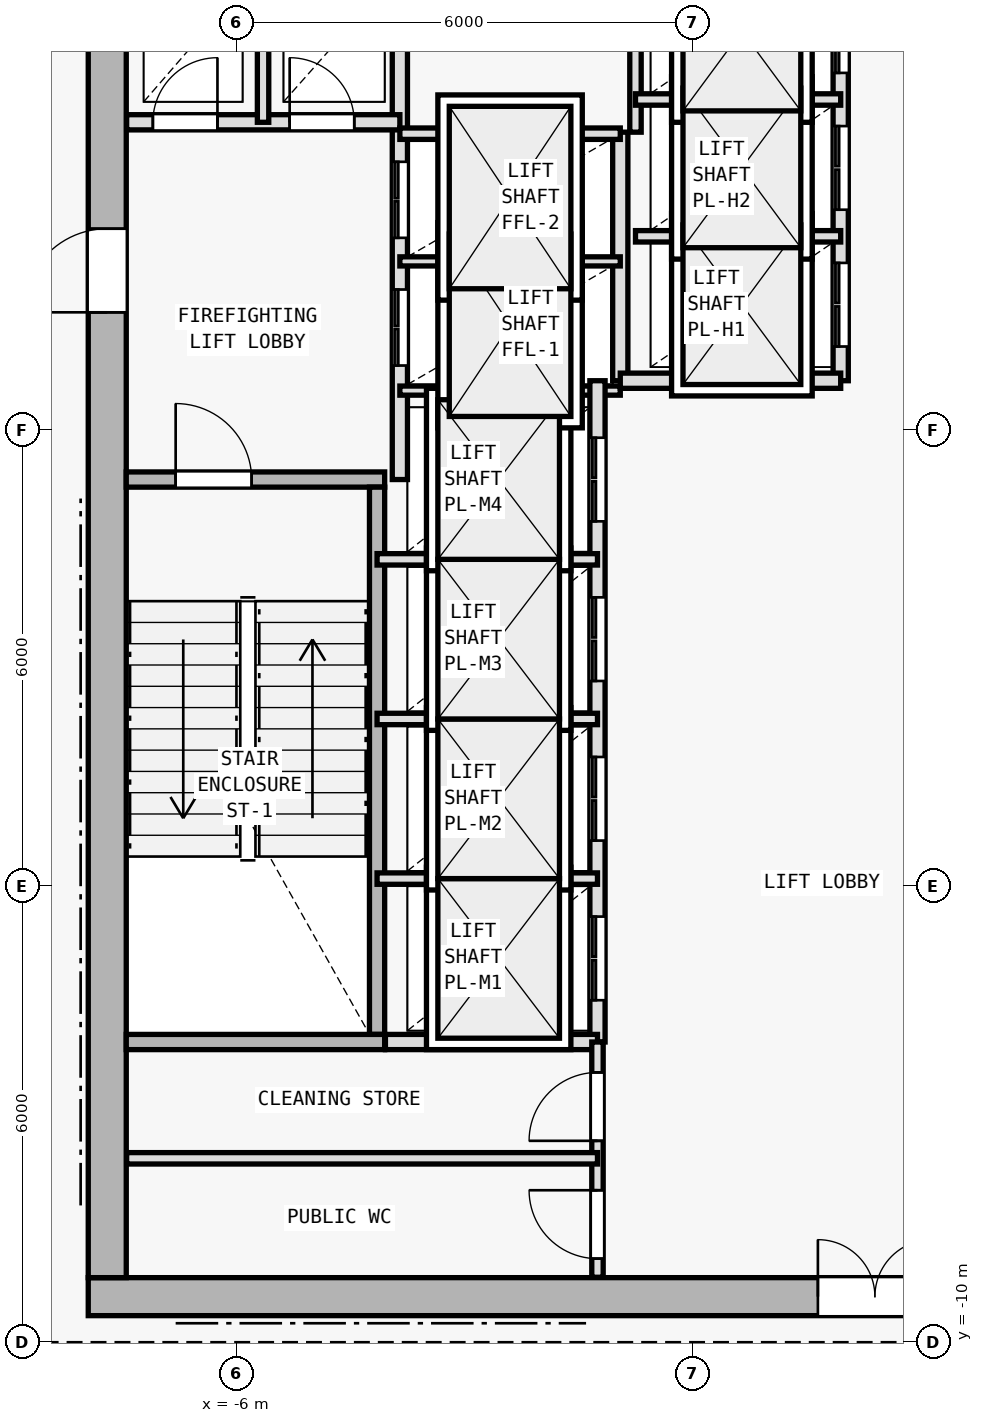
"""IFC4 building model, lengths in metres.
Left out: names, types, materials, properties, quantities, classifications, styles, units other than length and angle.
Written with IfcOpenShell. Run it as: python <this file> out.ifc"""

import sys

from ifc_helpers import new_model, si_unit, direction, frame, frame_2d, origin, origin_2d, place, context, subcontext, project, spatial, rectangle, i_section, extrude, element, fill, save


model = new_model("IFC4")
c1 = context("Model", 3, precision=1e-05, world=origin(), true_north=direction((0.0, 1.0)))
c2 = subcontext(c1, "Body", "Model", "MODEL_VIEW")
j1 = project(units=[si_unit("LENGTHUNIT", "METRE"), si_unit("PLANEANGLEUNIT", "RADIAN")], contexts=[c1])
p1 = place(None, origin())
s1 = spatial("IfcSite", under=j1, at=p1, CompositionType="ELEMENT")
p2 = place(p1, origin())
s2 = spatial("IfcBuilding", under=s1, at=p2, CompositionType="ELEMENT")
p3 = place(p2, frame((0.0, 0.0, 134.1)))
s3 = spatial("IfcBuildingStorey", under=s2, at=p3, CompositionType="ELEMENT", Elevation=134.1)
for number, where, z_axis, x_axis in (
    (1, (-7.7, -9.4, 0.0), (0.0, 0.0, 1.0), (1.0, 0.0, 0.0)),
    (2, (0.0, -9.4, 0.0), (0.0, 0.0, 1.0), (1.0, 0.0, 0.0)),
    (3, (-7.7, 2.0, 0.0), (0.0, 0.0, 1.0), (1.0, 0.0, 0.0)),
):
    element("IfcColumn", number, at=place(p3, frame(where, z_axis=z_axis, x_axis=x_axis)), inside=s3, PredefinedType="COLUMN", context=c2, shape_type="SweptSolid", body=[
        extrude(i_section(OverallWidth=0.409, OverallDepth=0.425, WebThickness=0.021, FlangeThickness=0.034, FilletRadius=0.015, at=origin_2d()), origin(), (0.0, 0.0, 1.0), 4.5),
    ])
p4 = place(p3, frame((-7.95, -9.4, 0.0), z_axis=(0.0, 0.0, 1.0), x_axis=(1.0, 0.0, 0.0)))
e4 = element("IfcWall", 4, at=p4, inside=s3, PredefinedType="SHEAR", context=c2, shape_type="SweptSolid", body=[
    extrude(rectangle(XDim=15.9, YDim=0.5, at=frame_2d((7.95, 0.0))), origin(), (0.0, 0.0, 1.0), 4.25),
])
p5 = place(p4, frame((9.6, 0.0, 0.0)))
e5 = element("IfcOpeningElement", 5, at=p5, cuts=e4, PredefinedType="OPENING", context=c2, shape_type="SweptSolid", body=[
    extrude(rectangle(XDim=1.5, YDim=2.2, at=frame_2d((0.75, 1.1))), frame((0.0, 0.26, 0.0), z_axis=(0.0, -1.0, 0.0), x_axis=(1.0, 0.0, 0.0)), (0.0, 0.0, 1.0), 0.52),
])
p6 = place(p3, frame((-7.7, -9.15, 0.0), z_axis=(0.0, 0.0, 1.0), x_axis=(0.0, 1.0, 0.0)))
e6 = element("IfcWall", 6, at=p6, inside=s3, PredefinedType="SHEAR", context=c2, shape_type="SweptSolid", body=[
    extrude(rectangle(XDim=19.1, YDim=0.5, at=frame_2d((9.55, 0.0))), origin(), (0.0, 0.0, 1.0), 4.25),
])
p7 = place(p6, frame((12.7, 0.0, 0.0)))
e7 = element("IfcOpeningElement", 7, at=p7, cuts=e6, PredefinedType="OPENING", context=c2, shape_type="SweptSolid", body=[
    extrude(rectangle(XDim=1.1, YDim=2.15, at=frame_2d((0.55, 1.075))), frame((0.0, 0.26, 0.0), z_axis=(0.0, -1.0, 0.0), x_axis=(1.0, 0.0, 0.0)), (0.0, 0.0, 1.0), 0.52),
])
p8 = place(p3, frame((-7.45, 1.35, 0.0), z_axis=(0.0, 0.0, 1.0), x_axis=(1.0, 0.0, 0.0)))
e8 = element("IfcWall", 8, at=p8, inside=s3, PredefinedType="SOLIDWALL", context=c2, shape_type="SweptSolid", body=[
    extrude(rectangle(XDim=3.4, YDim=0.2, at=frame_2d((1.7, 0.0))), origin(), (0.0, 0.0, 1.0), 4.25),
])
p9 = place(p8, frame((0.65, 0.0, 0.0)))
e9 = element("IfcOpeningElement", 9, at=p9, cuts=e8, PredefinedType="OPENING", context=c2, shape_type="SweptSolid", body=[
    extrude(rectangle(XDim=1.0, YDim=2.15, at=frame_2d((0.5, 1.075))), frame((0.0, 0.11, 0.0), z_axis=(0.0, -1.0, 0.0), x_axis=(1.0, 0.0, 0.0)), (0.0, 0.0, 1.0), 0.22),
])
p10 = place(p3, frame((-4.15, -5.95, 0.0), z_axis=(0.0, 0.0, 1.0), x_axis=(0.0, 1.0, 0.0)))
e10 = element("IfcWall", 10, at=p10, inside=s3, PredefinedType="SOLIDWALL", context=c2, shape_type="SweptSolid", body=[
    extrude(rectangle(XDim=7.2, YDim=0.2, at=frame_2d((3.6, 0.0))), origin(), (0.0, 0.0, 1.0), 4.25),
])
p11 = place(p3, frame((-3.85, 1.35, 0.0), z_axis=(0.0, 0.0, 1.0), x_axis=(0.0, 1.0, 0.0)))
e11 = element("IfcWall", 11, at=p11, inside=s3, PredefinedType="SOLIDWALL", context=c2, shape_type="SweptSolid", body=[
    extrude(rectangle(XDim=8.595, YDim=0.2, at=frame_2d((4.297, 0.0))), origin(), (0.0, 0.0, 1.0), 4.25),
])
p12 = place(p11, frame((1.5, 0.0, 0.0)))
e12 = element("IfcOpeningElement", 12, at=p12, cuts=e11, PredefinedType="OPENING", context=c2, shape_type="SweptSolid", body=[
    extrude(rectangle(XDim=1.0, YDim=2.15, at=frame_2d((0.5, 1.075))), frame((0.0, 0.11, 0.0), z_axis=(0.0, -1.0, 0.0), x_axis=(1.0, 0.0, 0.0)), (0.0, 0.0, 1.0), 0.22),
])
p13 = place(p11, frame((3.18, 0.0, 0.0)))
e13 = element("IfcOpeningElement", 13, at=p13, cuts=e11, PredefinedType="OPENING", context=c2, shape_type="SweptSolid", body=[
    extrude(rectangle(XDim=1.0, YDim=2.15, at=frame_2d((0.5, 1.075))), frame((0.0, 0.11, 0.0), z_axis=(0.0, -1.0, 0.0), x_axis=(1.0, 0.0, 0.0)), (0.0, 0.0, 1.0), 0.22),
])
p14 = place(p3, frame((-7.445, 6.05, 0.0), z_axis=(0.0, 0.0, 1.0), x_axis=(1.0, 0.0, 0.0)))
e14 = element("IfcWall", 14, at=p14, inside=s3, PredefinedType="SOLIDWALL", context=c2, shape_type="SweptSolid", body=[
    extrude(rectangle(XDim=3.595, YDim=0.2, at=frame_2d((1.797, 0.0))), origin(), (0.0, 0.0, 1.0), 4.25),
])
p15 = place(p14, frame((0.345, 0.0, 0.0)))
e15 = element("IfcOpeningElement", 15, at=p15, cuts=e14, PredefinedType="OPENING", context=c2, shape_type="SweptSolid", body=[
    extrude(rectangle(XDim=0.85, YDim=2.1, at=frame_2d((0.425, 1.05))), frame((0.0, 0.11, 0.0), z_axis=(0.0, -1.0, 0.0), x_axis=(1.0, 0.0, 0.0)), (0.0, 0.0, 1.0), 0.22),
])
p16 = place(p14, frame((2.145, 0.0, 0.0)))
e16 = element("IfcOpeningElement", 16, at=p16, cuts=e14, PredefinedType="OPENING", context=c2, shape_type="SweptSolid", body=[
    extrude(rectangle(XDim=0.85, YDim=2.1, at=frame_2d((0.425, 1.05))), frame((0.0, 0.11, 0.0), z_axis=(0.0, -1.0, 0.0), x_axis=(1.0, 0.0, 0.0)), (0.0, 0.0, 1.0), 0.22),
])
p17 = place(p3, frame((-5.65, 6.05, 0.0), z_axis=(0.0, 0.0, 1.0), x_axis=(0.0, 1.0, 0.0)))
e17 = element("IfcWall", 17, at=p17, inside=s3, PredefinedType="PARTITIONING", context=c2, shape_type="SweptSolid", body=[
    extrude(rectangle(XDim=2.05, YDim=0.15, at=frame_2d((1.025, 0.0))), origin(), (0.0, 0.0, 1.0), 4.25),
])
p18 = place(p3, frame((-0.95, 2.65, 0.0), z_axis=(0.0, 0.0, 1.0), x_axis=(0.0, 1.0, 0.0)))
e18 = element("IfcWall", 18, at=p18, inside=s3, PredefinedType="SOLIDWALL", context=c2, shape_type="SweptSolid", body=[
    extrude(rectangle(XDim=3.27, YDim=0.2, at=frame_2d((1.635, 0.0))), origin(), (0.0, 0.0, 1.0), 4.25),
])
for number, where, z_axis, x_axis in (
    (19, (-3.85, 2.52, 0.0), (0.0, 0.0, 1.0), (1.0, 0.0, 0.0)),
    (20, (-3.85, 4.22, 0.0), (0.0, 0.0, 1.0), (1.0, 0.0, 0.0)),
):
    element("IfcWall", number, at=place(p3, frame(where, z_axis=z_axis, x_axis=x_axis)), inside=s3, PredefinedType="PARTITIONING", context=c2, shape_type="SweptSolid", body=[
        extrude(rectangle(XDim=2.9, YDim=0.12, at=frame_2d((1.45, 0.0))), origin(), (0.0, 0.0, 1.0), 4.25),
    ])
p19 = place(p3, frame((-3.85, 5.9, 0.0), z_axis=(0.0, 0.0, 1.0), x_axis=(1.0, 0.0, 0.0)))
e21 = element("IfcWall", 21, at=p19, inside=s3, PredefinedType="PARTITIONING", context=c2, shape_type="SweptSolid", body=[
    extrude(rectangle(XDim=2.9, YDim=0.15, at=frame_2d((1.45, 0.0))), origin(), (0.0, 0.0, 1.0), 4.25),
])
p20 = place(p3, frame((-1.25, -6.05, 0.0), z_axis=(0.0, 0.0, 1.0), x_axis=(0.0, 1.0, 0.0)))
e22 = element("IfcWall", 22, at=p20, inside=s3, PredefinedType="SOLIDWALL", context=c2, shape_type="SweptSolid", body=[
    extrude(rectangle(XDim=8.7, YDim=0.2, at=frame_2d((4.35, 0.0))), origin(), (0.0, 0.0, 1.0), 4.25),
])
p21 = place(p20, frame((0.55, 0.0, 0.0)))
e23 = element("IfcOpeningElement", 23, at=p21, cuts=e22, PredefinedType="OPENING", context=c2, shape_type="SweptSolid", body=[
    extrude(rectangle(XDim=1.1, YDim=2.15, at=frame_2d((0.55, 1.075))), frame((0.0, 0.11, 0.0), z_axis=(0.0, -1.0, 0.0), x_axis=(1.0, 0.0, 0.0)), (0.0, 0.0, 1.0), 0.22),
])
p22 = place(p20, frame((2.65, 0.0, 0.0)))
e24 = element("IfcOpeningElement", 24, at=p22, cuts=e22, PredefinedType="OPENING", context=c2, shape_type="SweptSolid", body=[
    extrude(rectangle(XDim=1.1, YDim=2.15, at=frame_2d((0.55, 1.075))), frame((0.0, 0.11, 0.0), z_axis=(0.0, -1.0, 0.0), x_axis=(1.0, 0.0, 0.0)), (0.0, 0.0, 1.0), 0.22),
])
p23 = place(p20, frame((4.75, 0.0, 0.0)))
e25 = element("IfcOpeningElement", 25, at=p23, cuts=e22, PredefinedType="OPENING", context=c2, shape_type="SweptSolid", body=[
    extrude(rectangle(XDim=1.1, YDim=2.15, at=frame_2d((0.55, 1.075))), frame((0.0, 0.11, 0.0), z_axis=(0.0, -1.0, 0.0), x_axis=(1.0, 0.0, 0.0)), (0.0, 0.0, 1.0), 0.22),
])
p24 = place(p20, frame((6.85, 0.0, 0.0)))
e26 = element("IfcOpeningElement", 26, at=p24, cuts=e22, PredefinedType="OPENING", context=c2, shape_type="SweptSolid", body=[
    extrude(rectangle(XDim=1.1, YDim=2.15, at=frame_2d((0.55, 1.075))), frame((0.0, 0.11, 0.0), z_axis=(0.0, -1.0, 0.0), x_axis=(1.0, 0.0, 0.0)), (0.0, 0.0, 1.0), 0.22),
])
for number, where, z_axis, x_axis in (
    (27, (-4.15, -3.9, 0.0), (0.0, 0.0, 1.0), (1.0, 0.0, 0.0)),
    (28, (-4.15, -1.8, 0.0), (0.0, 0.0, 1.0), (1.0, 0.0, 0.0)),
    (29, (-4.15, 0.3, 0.0), (0.0, 0.0, 1.0), (1.0, 0.0, 0.0)),
):
    element("IfcWall", number, at=place(p3, frame(where, z_axis=z_axis, x_axis=x_axis)), inside=s3, PredefinedType="PARTITIONING", context=c2, shape_type="SweptSolid", body=[
        extrude(rectangle(XDim=2.9, YDim=0.15, at=frame_2d((1.45, 0.0))), origin(), (0.0, 0.0, 1.0), 4.25),
    ])
p25 = place(p3, frame((1.95, 2.65, 0.0), z_axis=(0.0, 0.0, 1.0), x_axis=(0.0, 1.0, 0.0)))
e30 = element("IfcWall", 30, at=p25, inside=s3, PredefinedType="SOLIDWALL", context=c2, shape_type="SweptSolid", body=[
    extrude(rectangle(XDim=7.295, YDim=0.2, at=frame_2d((3.647, 0.0))), origin(), (0.0, 0.0, 1.0), 4.25),
])
p26 = place(p25, frame((0.45, 0.0, 0.0)))
e31 = element("IfcOpeningElement", 31, at=p26, cuts=e30, PredefinedType="OPENING", context=c2, shape_type="SweptSolid", body=[
    extrude(rectangle(XDim=1.1, YDim=2.15, at=frame_2d((0.55, 1.075))), frame((0.0, 0.11, 0.0), z_axis=(0.0, -1.0, 0.0), x_axis=(1.0, 0.0, 0.0)), (0.0, 0.0, 1.0), 0.22),
])
p27 = place(p25, frame((2.25, 0.0, 0.0)))
e32 = element("IfcOpeningElement", 32, at=p27, cuts=e30, PredefinedType="OPENING", context=c2, shape_type="SweptSolid", body=[
    extrude(rectangle(XDim=1.1, YDim=2.15, at=frame_2d((0.55, 1.075))), frame((0.0, 0.11, 0.0), z_axis=(0.0, -1.0, 0.0), x_axis=(1.0, 0.0, 0.0)), (0.0, 0.0, 1.0), 0.22),
])
p28 = place(p25, frame((4.05, 0.0, 0.0)))
e33 = element("IfcOpeningElement", 33, at=p28, cuts=e30, PredefinedType="OPENING", context=c2, shape_type="SweptSolid", body=[
    extrude(rectangle(XDim=1.1, YDim=2.15, at=frame_2d((0.55, 1.075))), frame((0.0, 0.11, 0.0), z_axis=(0.0, -1.0, 0.0), x_axis=(1.0, 0.0, 0.0)), (0.0, 0.0, 1.0), 0.22),
])
p29 = place(p25, frame((5.85, 0.0, 0.0)))
e34 = element("IfcOpeningElement", 34, at=p29, cuts=e30, PredefinedType="OPENING", context=c2, shape_type="SweptSolid", body=[
    extrude(rectangle(XDim=1.1, YDim=2.15, at=frame_2d((0.55, 1.075))), frame((0.0, 0.11, 0.0), z_axis=(0.0, -1.0, 0.0), x_axis=(1.0, 0.0, 0.0)), (0.0, 0.0, 1.0), 0.22),
])
p30 = place(p3, frame((-0.95, 2.65, 0.0), z_axis=(0.0, 0.0, 1.0), x_axis=(1.0, 0.0, 0.0)))
e35 = element("IfcWall", 35, at=p30, inside=s3, PredefinedType="SOLIDWALL", context=c2, shape_type="SweptSolid", body=[
    extrude(rectangle(XDim=2.9, YDim=0.2, at=frame_2d((1.45, 0.0))), origin(), (0.0, 0.0, 1.0), 4.25),
])
p31 = place(p3, frame((-0.75, 5.92, 0.0), z_axis=(0.0, 0.0, 1.0), x_axis=(0.0, 1.0, 0.0)))
e36 = element("IfcWall", 36, at=p31, inside=s3, PredefinedType="PARTITIONING", context=c2, shape_type="SweptSolid", body=[
    extrude(rectangle(XDim=4.025, YDim=0.15, at=frame_2d((2.013, 0.0))), origin(), (0.0, 0.0, 1.0), 4.25),
])
for number, where, z_axis, x_axis in (
    (37, (-0.75, 4.55, 0.0), (0.0, 0.0, 1.0), (1.0, 0.0, 0.0)),
    (38, (-0.75, 6.35, 0.0), (0.0, 0.0, 1.0), (1.0, 0.0, 0.0)),
):
    element("IfcWall", number, at=place(p3, frame(where, z_axis=z_axis, x_axis=x_axis)), inside=s3, PredefinedType="PARTITIONING", context=c2, shape_type="SweptSolid", body=[
        extrude(rectangle(XDim=2.7, YDim=0.15, at=frame_2d((1.35, 0.0))), origin(), (0.0, 0.0, 1.0), 4.25),
    ])
p32 = place(p3, frame((-7.45, -6.05, 0.0), z_axis=(0.0, 0.0, 1.0), x_axis=(1.0, 0.0, 0.0)))
e39 = element("IfcWall", 39, at=p32, inside=s3, PredefinedType="SOLIDWALL", context=c2, shape_type="SweptSolid", body=[
    extrude(rectangle(XDim=3.4, YDim=0.2, at=frame_2d((1.7, 0.0))), origin(), (0.0, 0.0, 1.0), 4.25),
])
p33 = place(p3, frame((-4.04, -6.05, 0.0), z_axis=(0.0, 0.0, 1.0), x_axis=(1.0, 0.0, 0.0)))
e40 = element("IfcWall", 40, at=p33, inside=s3, PredefinedType="SOLIDWALL", context=c2, shape_type="SweptSolid", body=[
    extrude(rectangle(XDim=2.79, YDim=0.2, at=frame_2d((1.395, 0.0))), origin(), (0.0, 0.0, 1.0), 4.25),
])
p34 = place(p3, frame((-1.25, -9.145, 0.0), z_axis=(0.0, 0.0, 1.0), x_axis=(0.0, 1.0, 0.0)))
e41 = element("IfcWall", 41, at=p34, inside=s3, PredefinedType="PARTITIONING", context=c2, shape_type="SweptSolid", body=[
    extrude(rectangle(XDim=3.095, YDim=0.15, at=frame_2d((1.547, 0.0))), origin(), (0.0, 0.0, 1.0), 4.25),
])
p35 = place(p34, frame((1.795, 0.0, 0.0)))
e42 = element("IfcOpeningElement", 42, at=p35, cuts=e41, PredefinedType="OPENING", context=c2, shape_type="SweptSolid", body=[
    extrude(rectangle(XDim=0.9, YDim=2.1, at=frame_2d((0.45, 1.05))), frame((0.0, 0.085, 0.0), z_axis=(0.0, -1.0, 0.0), x_axis=(1.0, 0.0, 0.0)), (0.0, 0.0, 1.0), 0.17),
])
p36 = place(p34, frame((0.245, 0.0, 0.0)))
e43 = element("IfcOpeningElement", 43, at=p36, cuts=e41, PredefinedType="OPENING", context=c2, shape_type="SweptSolid", body=[
    extrude(rectangle(XDim=0.9, YDim=2.1, at=frame_2d((0.45, 1.05))), frame((0.0, 0.085, 0.0), z_axis=(0.0, -1.0, 0.0), x_axis=(1.0, 0.0, 0.0)), (0.0, 0.0, 1.0), 0.17),
])
p37 = place(p3, frame((-7.445, -7.58, 0.0), z_axis=(0.0, 0.0, 1.0), x_axis=(1.0, 0.0, 0.0)))
e44 = element("IfcWall", 44, at=p37, inside=s3, PredefinedType="PARTITIONING", context=c2, shape_type="SweptSolid", body=[
    extrude(rectangle(XDim=6.195, YDim=0.15, at=frame_2d((3.098, 0.0))), origin(), (0.0, 0.0, 1.0), 4.25),
])
p38 = place(p5, origin())
e45 = element("IfcDoor", 45, at=p38, inside=s3, OperationType="DOUBLE_DOOR_SINGLE_SWING", PredefinedType="DOOR", context=c2, shape_type="SweptSolid", body=[
    extrude(rectangle(XDim=1.5, YDim=2.2, at=frame_2d((0.75, 1.1))), frame((0.0, 0.025, 0.0), z_axis=(0.0, -1.0, 0.0), x_axis=(1.0, 0.0, 0.0)), (0.0, 0.0, 1.0), 0.05),
])
fill(e5, e45)
p39 = place(p7, origin())
e46 = element("IfcDoor", 46, at=p39, inside=s3, OperationType="SINGLE_SWING_LEFT", PredefinedType="DOOR", context=c2, shape_type="SweptSolid", body=[
    extrude(rectangle(XDim=1.1, YDim=2.15, at=frame_2d((0.55, 1.075))), frame((0.0, 0.025, 0.0), z_axis=(0.0, -1.0, 0.0), x_axis=(1.0, 0.0, 0.0)), (0.0, 0.0, 1.0), 0.05),
])
fill(e7, e46)
p40 = place(p9, origin())
e47 = element("IfcDoor", 47, at=p40, inside=s3, OperationType="SINGLE_SWING_LEFT", PredefinedType="DOOR", context=c2, shape_type="SweptSolid", body=[
    extrude(rectangle(XDim=1.0, YDim=2.15, at=frame_2d((0.5, 1.075))), frame((0.0, 0.025, 0.0), z_axis=(0.0, -1.0, 0.0), x_axis=(1.0, 0.0, 0.0)), (0.0, 0.0, 1.0), 0.05),
])
fill(e9, e47)
p41 = place(p15, origin())
e48 = element("IfcDoor", 48, at=p41, inside=s3, OperationType="SINGLE_SWING_RIGHT", PredefinedType="DOOR", context=c2, shape_type="SweptSolid", body=[
    extrude(rectangle(XDim=0.85, YDim=2.1, at=frame_2d((0.425, 1.05))), frame((0.0, 0.025, 0.0), z_axis=(0.0, -1.0, 0.0), x_axis=(1.0, 0.0, 0.0)), (0.0, 0.0, 1.0), 0.05),
])
fill(e15, e48)
p42 = place(p16, origin())
e49 = element("IfcDoor", 49, at=p42, inside=s3, OperationType="SINGLE_SWING_LEFT", PredefinedType="DOOR", context=c2, shape_type="SweptSolid", body=[
    extrude(rectangle(XDim=0.85, YDim=2.1, at=frame_2d((0.425, 1.05))), frame((0.0, 0.025, 0.0), z_axis=(0.0, -1.0, 0.0), x_axis=(1.0, 0.0, 0.0)), (0.0, 0.0, 1.0), 0.05),
])
fill(e16, e49)
p43 = place(p21, origin())
e50 = element("IfcDoor", 50, at=p43, inside=s3, OperationType="DOUBLE_DOOR_SLIDING", PredefinedType="DOOR", context=c2, shape_type="SweptSolid", body=[
    extrude(rectangle(XDim=1.1, YDim=2.15, at=frame_2d((0.55, 1.075))), frame((0.0, 0.025, 0.0), z_axis=(0.0, -1.0, 0.0), x_axis=(1.0, 0.0, 0.0)), (0.0, 0.0, 1.0), 0.05),
])
fill(e23, e50)
p44 = place(p22, origin())
e51 = element("IfcDoor", 51, at=p44, inside=s3, OperationType="DOUBLE_DOOR_SLIDING", PredefinedType="DOOR", context=c2, shape_type="SweptSolid", body=[
    extrude(rectangle(XDim=1.1, YDim=2.15, at=frame_2d((0.55, 1.075))), frame((0.0, 0.025, 0.0), z_axis=(0.0, -1.0, 0.0), x_axis=(1.0, 0.0, 0.0)), (0.0, 0.0, 1.0), 0.05),
])
fill(e24, e51)
p45 = place(p23, origin())
e52 = element("IfcDoor", 52, at=p45, inside=s3, OperationType="DOUBLE_DOOR_SLIDING", PredefinedType="DOOR", context=c2, shape_type="SweptSolid", body=[
    extrude(rectangle(XDim=1.1, YDim=2.15, at=frame_2d((0.55, 1.075))), frame((0.0, 0.025, 0.0), z_axis=(0.0, -1.0, 0.0), x_axis=(1.0, 0.0, 0.0)), (0.0, 0.0, 1.0), 0.05),
])
fill(e25, e52)
p46 = place(p24, origin())
e53 = element("IfcDoor", 53, at=p46, inside=s3, OperationType="DOUBLE_DOOR_SLIDING", PredefinedType="DOOR", context=c2, shape_type="SweptSolid", body=[
    extrude(rectangle(XDim=1.1, YDim=2.15, at=frame_2d((0.55, 1.075))), frame((0.0, 0.025, 0.0), z_axis=(0.0, -1.0, 0.0), x_axis=(1.0, 0.0, 0.0)), (0.0, 0.0, 1.0), 0.05),
])
fill(e26, e53)
p47 = place(p26, origin())
e54 = element("IfcDoor", 54, at=p47, inside=s3, OperationType="DOUBLE_DOOR_SLIDING", PredefinedType="DOOR", context=c2, shape_type="SweptSolid", body=[
    extrude(rectangle(XDim=1.1, YDim=2.15, at=frame_2d((0.55, 1.075))), frame((0.0, 0.025, 0.0), z_axis=(0.0, -1.0, 0.0), x_axis=(1.0, 0.0, 0.0)), (0.0, 0.0, 1.0), 0.05),
])
fill(e31, e54)
p48 = place(p27, origin())
e55 = element("IfcDoor", 55, at=p48, inside=s3, OperationType="DOUBLE_DOOR_SLIDING", PredefinedType="DOOR", context=c2, shape_type="SweptSolid", body=[
    extrude(rectangle(XDim=1.1, YDim=2.15, at=frame_2d((0.55, 1.075))), frame((0.0, 0.025, 0.0), z_axis=(0.0, -1.0, 0.0), x_axis=(1.0, 0.0, 0.0)), (0.0, 0.0, 1.0), 0.05),
])
fill(e32, e55)
p49 = place(p28, origin())
e56 = element("IfcDoor", 56, at=p49, inside=s3, OperationType="DOUBLE_DOOR_SLIDING", PredefinedType="DOOR", context=c2, shape_type="SweptSolid", body=[
    extrude(rectangle(XDim=1.1, YDim=2.15, at=frame_2d((0.55, 1.075))), frame((0.0, 0.025, 0.0), z_axis=(0.0, -1.0, 0.0), x_axis=(1.0, 0.0, 0.0)), (0.0, 0.0, 1.0), 0.05),
])
fill(e33, e56)
p50 = place(p12, origin())
e57 = element("IfcDoor", 57, at=p50, inside=s3, OperationType="DOUBLE_DOOR_SLIDING", PredefinedType="DOOR", context=c2, shape_type="SweptSolid", body=[
    extrude(rectangle(XDim=1.0, YDim=2.15, at=frame_2d((0.5, 1.075))), frame((0.0, 0.025, 0.0), z_axis=(0.0, -1.0, 0.0), x_axis=(1.0, 0.0, 0.0)), (0.0, 0.0, 1.0), 0.05),
])
fill(e12, e57)
p51 = place(p13, origin())
e58 = element("IfcDoor", 58, at=p51, inside=s3, OperationType="DOUBLE_DOOR_SLIDING", PredefinedType="DOOR", context=c2, shape_type="SweptSolid", body=[
    extrude(rectangle(XDim=1.0, YDim=2.15, at=frame_2d((0.5, 1.075))), frame((0.0, 0.025, 0.0), z_axis=(0.0, -1.0, 0.0), x_axis=(1.0, 0.0, 0.0)), (0.0, 0.0, 1.0), 0.05),
])
fill(e13, e58)
p52 = place(p35, origin())
e59 = element("IfcDoor", 59, at=p52, inside=s3, OperationType="SINGLE_SWING_LEFT", PredefinedType="DOOR", context=c2, shape_type="SweptSolid", body=[
    extrude(rectangle(XDim=0.9, YDim=2.1, at=frame_2d((0.45, 1.05))), frame((0.0, 0.025, 0.0), z_axis=(0.0, -1.0, 0.0), x_axis=(1.0, 0.0, 0.0)), (0.0, 0.0, 1.0), 0.05),
])
fill(e42, e59)
p53 = place(p36, origin())
e60 = element("IfcDoor", 60, at=p53, inside=s3, OperationType="SINGLE_SWING_RIGHT", PredefinedType="DOOR", context=c2, shape_type="SweptSolid", body=[
    extrude(rectangle(XDim=0.9, YDim=2.1, at=frame_2d((0.45, 1.05))), frame((0.0, 0.025, 0.0), z_axis=(0.0, -1.0, 0.0), x_axis=(1.0, 0.0, 0.0)), (0.0, 0.0, 1.0), 0.05),
])
fill(e43, e60)
save(model, sys.argv[1])
